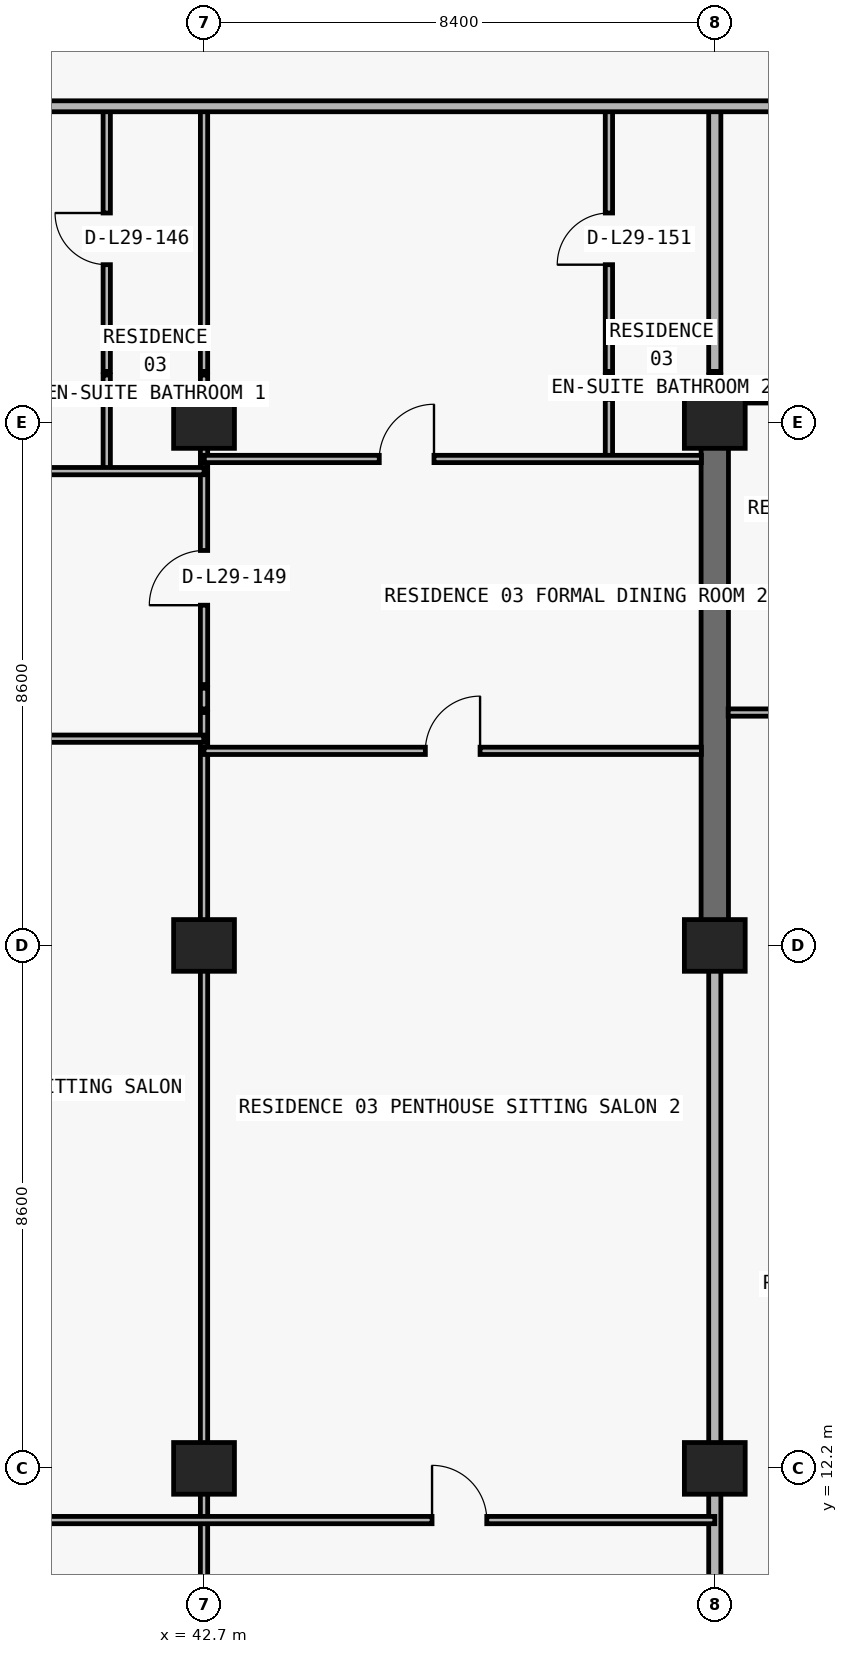
"""IFC4 building model, lengths in metres.
Left out: names, types, materials, properties, quantities, classifications, styles, units other than length and angle.
Written with IfcOpenShell. Run it as: python <this file> out.ifc"""

import sys

from ifc_helpers import new_model, si_unit, direction, frame, frame_2d, origin, origin_2d, place, context, subcontext, project, spatial, rectangle, extrude, element, fill, save


model = new_model("IFC4")
c1 = context("Model", 3, precision=1e-05, world=origin(), true_north=direction((0.0, 1.0)))
c2 = subcontext(c1, "Body", "Model", "MODEL_VIEW")
j1 = project(units=[si_unit("LENGTHUNIT", "METRE"), si_unit("PLANEANGLEUNIT", "RADIAN")], contexts=[c1])
p1 = place(None, origin())
s1 = spatial("IfcSite", under=j1, at=p1, CompositionType="ELEMENT")
p2 = place(p1, origin())
s2 = spatial("IfcBuilding", under=s1, at=p2, CompositionType="ELEMENT")
p3 = place(p2, frame((0.0, 0.0, 109.2)))
s3 = spatial("IfcBuildingStorey", under=s2, at=p3, CompositionType="ELEMENT", Elevation=109.2)
for number, where, z_axis, x_axis in (
    (1, (42.7, 12.2, 0.0), (0.0, 0.0, 1.0), (1.0, 0.0, 0.0)),
    (2, (51.1, 12.2, 0.0), (0.0, 0.0, 1.0), (1.0, 0.0, 0.0)),
    (3, (42.7, 20.8, 0.0), (0.0, 0.0, 1.0), (1.0, 0.0, 0.0)),
    (4, (51.1, 20.8, 0.0), (0.0, 0.0, 1.0), (1.0, 0.0, 0.0)),
    (5, (42.7, 29.4, 0.0), (0.0, 0.0, 1.0), (1.0, 0.0, 0.0)),
    (6, (51.1, 29.4, 0.0), (0.0, 0.0, 1.0), (1.0, 0.0, 0.0)),
):
    element("IfcColumn", number, at=place(p3, frame(where, z_axis=z_axis, x_axis=x_axis)), inside=s3, PredefinedType="COLUMN", context=c2, shape_type="SweptSolid", body=[
        extrude(rectangle(XDim=1.0, YDim=0.85, at=origin_2d()), origin(), (0.0, 0.0, 1.0), 3.05),
    ])
p4 = place(p3, frame((51.1, 20.8, 0.0), z_axis=(0.0, 0.0, 1.0), x_axis=(0.0, 1.0, 0.0)))
e7 = element("IfcWall", 7, at=p4, inside=s3, PredefinedType="SHEAR", context=c2, shape_type="SweptSolid", body=[
    extrude(rectangle(XDim=8.6, YDim=0.45, at=frame_2d((4.3, 0.0))), origin(), (0.0, 0.0, 1.0), 3.05),
])
p5 = place(p3, frame((41.1, 28.6, 0.0), z_axis=(0.0, 0.0, 1.0), x_axis=(0.0, 1.0, 0.0)))
e8 = element("IfcWall", 8, at=p5, inside=s3, PredefinedType="PARTITIONING", context=c2, shape_type="SweptSolid", body=[
    extrude(rectangle(XDim=1.18, YDim=0.12, at=frame_2d((0.59, 0.0))), origin(), (0.0, 0.0, 1.0), 2.679),
])
p6 = place(p3, frame((41.1, 29.84, 0.0), z_axis=(0.0, 0.0, 1.0), x_axis=(0.0, 1.0, 0.0)))
e9 = element("IfcWall", 9, at=p6, inside=s3, PredefinedType="PARTITIONING", context=c2, shape_type="SweptSolid", body=[
    extrude(rectangle(XDim=0.34, YDim=0.12, at=frame_2d((0.17, 0.0))), origin(), (0.0, 0.0, 1.0), 3.05),
])
p7 = place(p3, frame((41.1, 30.24, 0.0), z_axis=(0.0, 0.0, 1.0), x_axis=(0.0, 1.0, 0.0)))
e10 = element("IfcWall", 10, at=p7, inside=s3, PredefinedType="PARTITIONING", context=c2, shape_type="SweptSolid", body=[
    extrude(rectangle(XDim=4.36, YDim=0.12, at=frame_2d((2.18, 0.0))), origin(), (0.0, 0.0, 1.0), 3.05),
])
p8 = place(p7, frame((1.755, 0.0, 0.0)))
e11 = element("IfcOpeningElement", 11, at=p8, cuts=e10, PredefinedType="OPENING", context=c2, shape_type="SweptSolid", body=[
    extrude(rectangle(XDim=0.85, YDim=2.1, at=frame_2d((0.425, 1.05))), frame((0.0, 0.07, 0.0), z_axis=(0.0, -1.0, 0.0), x_axis=(1.0, 0.0, 0.0)), (0.0, 0.0, 1.0), 0.14),
])
p9 = place(p3, frame((42.7, 8.84, 0.0), z_axis=(0.0, 0.0, 1.0), x_axis=(0.0, 1.0, 0.0)))
e12 = element("IfcWall", 12, at=p9, inside=s3, PredefinedType="PARTITIONING", context=c2, shape_type="SweptSolid", body=[
    extrude(rectangle(XDim=15.79, YDim=0.12, at=frame_2d((7.895, 0.0))), origin(), (0.0, 0.0, 1.0), 2.174),
])
p10 = place(p3, frame((42.7, 24.69, 0.0), z_axis=(0.0, 0.0, 1.0), x_axis=(0.0, 1.0, 0.0)))
e13 = element("IfcWall", 13, at=p10, inside=s3, PredefinedType="PARTITIONING", context=c2, shape_type="SweptSolid", body=[
    extrude(rectangle(XDim=0.34, YDim=0.12, at=frame_2d((0.17, 0.0))), origin(), (0.0, 0.0, 1.0), 2.174),
])
p11 = place(p3, frame((42.7, 25.09, 0.0), z_axis=(0.0, 0.0, 1.0), x_axis=(0.0, 1.0, 0.0)))
e14 = element("IfcWall", 14, at=p11, inside=s3, PredefinedType="PARTITIONING", context=c2, shape_type="SweptSolid", body=[
    extrude(rectangle(XDim=4.69, YDim=0.12, at=frame_2d((2.345, 0.0))), origin(), (0.0, 0.0, 1.0), 2.174),
])
p12 = place(p11, frame((1.305, 0.0, 0.0)))
e15 = element("IfcOpeningElement", 15, at=p12, cuts=e14, PredefinedType="OPENING", context=c2, shape_type="SweptSolid", body=[
    extrude(rectangle(XDim=0.9, YDim=2.124, at=frame_2d((0.45, 1.062))), frame((0.0, 0.07, 0.0), z_axis=(0.0, -1.0, 0.0), x_axis=(1.0, 0.0, 0.0)), (0.0, 0.0, 1.0), 0.14),
])
p13 = place(p3, frame((42.7, 29.84, 0.0), z_axis=(0.0, 0.0, 1.0), x_axis=(0.0, 1.0, 0.0)))
e16 = element("IfcWall", 16, at=p13, inside=s3, PredefinedType="PARTITIONING", context=c2, shape_type="SweptSolid", body=[
    extrude(rectangle(XDim=0.34, YDim=0.12, at=frame_2d((0.17, 0.0))), origin(), (0.0, 0.0, 1.0), 2.174),
])
p14 = place(p3, frame((42.7, 30.24, 0.0), z_axis=(0.0, 0.0, 1.0), x_axis=(0.0, 1.0, 0.0)))
e17 = element("IfcWall", 17, at=p14, inside=s3, PredefinedType="PARTITIONING", context=c2, shape_type="SweptSolid", body=[
    extrude(rectangle(XDim=4.36, YDim=0.12, at=frame_2d((2.18, 0.0))), origin(), (0.0, 0.0, 1.0), 2.174),
])
p15 = place(p3, frame((49.359, 28.8, 0.0), z_axis=(0.0, 0.0, 1.0), x_axis=(0.0, 1.0, 0.0)))
e18 = element("IfcWall", 18, at=p15, inside=s3, PredefinedType="PARTITIONING", context=c2, shape_type="SweptSolid", body=[
    extrude(rectangle(XDim=0.98, YDim=0.12, at=frame_2d((0.49, 0.0))), origin(), (0.0, 0.0, 1.0), 3.05),
])
p16 = place(p3, frame((49.359, 29.84, 0.0), z_axis=(0.0, 0.0, 1.0), x_axis=(0.0, 1.0, 0.0)))
e19 = element("IfcWall", 19, at=p16, inside=s3, PredefinedType="PARTITIONING", context=c2, shape_type="SweptSolid", body=[
    extrude(rectangle(XDim=0.34, YDim=0.12, at=frame_2d((0.17, 0.0))), origin(), (0.0, 0.0, 1.0), 3.05),
])
p17 = place(p3, frame((49.359, 30.24, 0.0), z_axis=(0.0, 0.0, 1.0), x_axis=(0.0, 1.0, 0.0)))
e20 = element("IfcWall", 20, at=p17, inside=s3, PredefinedType="PARTITIONING", context=c2, shape_type="SweptSolid", body=[
    extrude(rectangle(XDim=4.36, YDim=0.12, at=frame_2d((2.18, 0.0))), origin(), (0.0, 0.0, 1.0), 3.05),
])
p18 = place(p17, frame((1.755, 0.0, 0.0)))
e21 = element("IfcOpeningElement", 21, at=p18, cuts=e20, PredefinedType="OPENING", context=c2, shape_type="SweptSolid", body=[
    extrude(rectangle(XDim=0.85, YDim=2.1, at=frame_2d((0.425, 1.05))), frame((0.0, 0.07, 0.0), z_axis=(0.0, -1.0, 0.0), x_axis=(1.0, 0.0, 0.0)), (0.0, 0.0, 1.0), 0.14),
])
p19 = place(p3, frame((51.1, 8.84, 0.0), z_axis=(0.0, 0.0, 1.0), x_axis=(0.0, 1.0, 0.0)))
e22 = element("IfcWall", 22, at=p19, inside=s3, PredefinedType="PARTITIONING", context=c2, shape_type="SweptSolid", body=[
    extrude(rectangle(XDim=11.955, YDim=0.2, at=frame_2d((5.978, 0.0))), origin(), (0.0, 0.0, 1.0), 2.174),
])
p20 = place(p3, frame((51.1, 29.405, 0.0), z_axis=(0.0, 0.0, 1.0), x_axis=(0.0, 1.0, 0.0)))
e23 = element("IfcWall", 23, at=p20, inside=s3, PredefinedType="PARTITIONING", context=c2, shape_type="SweptSolid", body=[
    extrude(rectangle(XDim=0.375, YDim=0.2, at=frame_2d((0.188, 0.0))), origin(), (0.0, 0.0, 1.0), 3.05),
])
p21 = place(p3, frame((51.1, 29.84, 0.0), z_axis=(0.0, 0.0, 1.0), x_axis=(0.0, 1.0, 0.0)))
e24 = element("IfcWall", 24, at=p21, inside=s3, PredefinedType="PARTITIONING", context=c2, shape_type="SweptSolid", body=[
    extrude(rectangle(XDim=0.34, YDim=0.2, at=frame_2d((0.17, 0.0))), origin(), (0.0, 0.0, 1.0), 2.335),
])
p22 = place(p3, frame((51.1, 30.24, 0.0), z_axis=(0.0, 0.0, 1.0), x_axis=(0.0, 1.0, 0.0)))
e25 = element("IfcWall", 25, at=p22, inside=s3, PredefinedType="PARTITIONING", context=c2, shape_type="SweptSolid", body=[
    extrude(rectangle(XDim=4.36, YDim=0.2, at=frame_2d((2.18, 0.0))), origin(), (0.0, 0.0, 1.0), 2.335),
])
p23 = place(p3, frame((35.1, 11.35, 0.0), z_axis=(0.0, 0.0, 1.0), x_axis=(1.0, 0.0, 0.0)))
e26 = element("IfcWall", 26, at=p23, inside=s3, PredefinedType="PARTITIONING", context=c2, shape_type="SweptSolid", body=[
    extrude(rectangle(XDim=16.0, YDim=0.12, at=frame_2d((8.0, 0.0))), origin(), (0.0, 0.0, 1.0), 3.05),
])
p24 = place(p23, frame((3.35, 0.0, 0.0)))
e27 = element("IfcOpeningElement", 27, at=p24, cuts=e26, PredefinedType="OPENING", context=c2, shape_type="SweptSolid", body=[
    extrude(rectangle(XDim=0.9, YDim=2.15, at=frame_2d((0.45, 1.075))), frame((0.0, 0.07, 0.0), z_axis=(0.0, -1.0, 0.0), x_axis=(1.0, 0.0, 0.0)), (0.0, 0.0, 1.0), 0.14),
])
p25 = place(p23, frame((11.35, 0.0, 0.0)))
e28 = element("IfcOpeningElement", 28, at=p25, cuts=e26, PredefinedType="OPENING", context=c2, shape_type="SweptSolid", body=[
    extrude(rectangle(XDim=0.9, YDim=2.15, at=frame_2d((0.45, 1.075))), frame((0.0, 0.07, 0.0), z_axis=(0.0, -1.0, 0.0), x_axis=(1.0, 0.0, 0.0)), (0.0, 0.0, 1.0), 0.14),
])
p26 = place(p3, frame((42.7, 24.0, 0.0), z_axis=(0.0, 0.0, 1.0), x_axis=(1.0, 0.0, 0.0)))
e29 = element("IfcWall", 29, at=p26, inside=s3, PredefinedType="PARTITIONING", context=c2, shape_type="SweptSolid", body=[
    extrude(rectangle(XDim=8.18, YDim=0.12, at=frame_2d((4.09, 0.0))), origin(), (0.0, 0.0, 1.0), 3.05),
])
p27 = place(p26, frame((3.64, 0.0, 0.0)))
e30 = element("IfcOpeningElement", 30, at=p27, cuts=e29, PredefinedType="OPENING", context=c2, shape_type="SweptSolid", body=[
    extrude(rectangle(XDim=0.9, YDim=2.15, at=frame_2d((0.45, 1.075))), frame((0.0, 0.07, 0.0), z_axis=(0.0, -1.0, 0.0), x_axis=(1.0, 0.0, 0.0)), (0.0, 0.0, 1.0), 0.14),
])
p28 = place(p3, frame((35.105, 24.2, 0.0), z_axis=(0.0, 0.0, 1.0), x_axis=(1.0, 0.0, 0.0)))
e31 = element("IfcWall", 31, at=p28, inside=s3, PredefinedType="PARTITIONING", context=c2, shape_type="SweptSolid", body=[
    extrude(rectangle(XDim=7.59, YDim=0.12, at=frame_2d((3.795, 0.0))), origin(), (0.0, 0.0, 1.0), 3.05),
])
p29 = place(p28, frame((3.345, 0.0, 0.0)))
e32 = element("IfcOpeningElement", 32, at=p29, cuts=e31, PredefinedType="OPENING", context=c2, shape_type="SweptSolid", body=[
    extrude(rectangle(XDim=0.9, YDim=2.15, at=frame_2d((0.45, 1.075))), frame((0.0, 0.07, 0.0), z_axis=(0.0, -1.0, 0.0), x_axis=(1.0, 0.0, 0.0)), (0.0, 0.0, 1.0), 0.14),
])
p30 = place(p3, frame((51.32, 24.63, 0.0), z_axis=(0.0, 0.0, 1.0), x_axis=(1.0, 0.0, 0.0)))
e33 = element("IfcWall", 33, at=p30, inside=s3, PredefinedType="PARTITIONING", context=c2, shape_type="SweptSolid", body=[
    extrude(rectangle(XDim=8.18, YDim=0.12, at=frame_2d((4.09, 0.0))), origin(), (0.0, 0.0, 1.0), 3.05),
])
p31 = place(p30, frame((1.583, 0.0, 0.0)))
e34 = element("IfcOpeningElement", 34, at=p31, cuts=e33, PredefinedType="OPENING", context=c2, shape_type="SweptSolid", body=[
    extrude(rectangle(XDim=0.9, YDim=2.15, at=frame_2d((0.45, 1.075))), frame((0.0, 0.07, 0.0), z_axis=(0.0, -1.0, 0.0), x_axis=(1.0, 0.0, 0.0)), (0.0, 0.0, 1.0), 0.14),
])
p32 = place(p30, frame((5.84, 0.0, 0.0)))
e35 = element("IfcOpeningElement", 35, at=p32, cuts=e33, PredefinedType="OPENING", context=c2, shape_type="SweptSolid", body=[
    extrude(rectangle(XDim=0.9, YDim=2.15, at=frame_2d((0.45, 1.075))), frame((0.0, 0.07, 0.0), z_axis=(0.0, -1.0, 0.0), x_axis=(1.0, 0.0, 0.0)), (0.0, 0.0, 1.0), 0.14),
])
p33 = place(p3, frame((35.1, 28.6, 0.0), z_axis=(0.0, 0.0, 1.0), x_axis=(1.0, 0.0, 0.0)))
e36 = element("IfcWall", 36, at=p33, inside=s3, PredefinedType="PARTITIONING", context=c2, shape_type="SweptSolid", body=[
    extrude(rectangle(XDim=7.6, YDim=0.12, at=frame_2d((3.8, 0.0))), origin(), (0.0, 0.0, 1.0), 3.05),
])
p34 = place(p33, frame((2.55, 0.0, 0.0)))
e37 = element("IfcOpeningElement", 37, at=p34, cuts=e36, PredefinedType="OPENING", context=c2, shape_type="SweptSolid", body=[
    extrude(rectangle(XDim=0.9, YDim=2.15, at=frame_2d((0.45, 1.075))), frame((0.0, 0.07, 0.0), z_axis=(0.0, -1.0, 0.0), x_axis=(1.0, 0.0, 0.0)), (0.0, 0.0, 1.0), 0.14),
])
p35 = place(p3, frame((42.705, 28.8, 0.0), z_axis=(0.0, 0.0, 1.0), x_axis=(1.0, 0.0, 0.0)))
e38 = element("IfcWall", 38, at=p35, inside=s3, PredefinedType="PARTITIONING", context=c2, shape_type="SweptSolid", body=[
    extrude(rectangle(XDim=8.175, YDim=0.12, at=frame_2d((4.087, 0.0))), origin(), (0.0, 0.0, 1.0), 3.05),
])
p36 = place(p35, frame((2.877, 0.0, 0.0)))
e39 = element("IfcOpeningElement", 39, at=p36, cuts=e38, PredefinedType="OPENING", context=c2, shape_type="SweptSolid", body=[
    extrude(rectangle(XDim=0.9, YDim=2.15, at=frame_2d((0.45, 1.075))), frame((0.0, 0.07, 0.0), z_axis=(0.0, -1.0, 0.0), x_axis=(1.0, 0.0, 0.0)), (0.0, 0.0, 1.0), 0.14),
])
p37 = place(p3, frame((51.1, 29.78, 0.0), z_axis=(0.0, 0.0, 1.0), x_axis=(1.0, 0.0, 0.0)))
e40 = element("IfcWall", 40, at=p37, inside=s3, PredefinedType="PARTITIONING", context=c2, shape_type="SweptSolid", body=[
    extrude(rectangle(XDim=8.4, YDim=0.12, at=frame_2d((4.2, 0.0))), origin(), (0.0, 0.0, 1.0), 3.05),
])
p38 = place(p37, frame((1.693, 0.0, 0.0)))
e41 = element("IfcOpeningElement", 41, at=p38, cuts=e40, PredefinedType="OPENING", context=c2, shape_type="SweptSolid", body=[
    extrude(rectangle(XDim=0.9, YDim=2.15, at=frame_2d((0.45, 1.075))), frame((0.0, 0.07, 0.0), z_axis=(0.0, -1.0, 0.0), x_axis=(1.0, 0.0, 0.0)), (0.0, 0.0, 1.0), 0.14),
])
p39 = place(p3, frame((26.7, 34.6, 0.0), z_axis=(0.0, 0.0, 1.0), x_axis=(1.0, 0.0, 0.0)))
e42 = element("IfcWall", 42, at=p39, inside=s3, PredefinedType="PARTITIONING", context=c2, shape_type="SweptSolid", body=[
    extrude(rectangle(XDim=32.8, YDim=0.18, at=frame_2d((16.4, 0.0))), origin(), (0.0, 0.0, 1.0), 3.05),
])
p40 = place(p39, frame((2.812, 0.0, 0.0)))
e43 = element("IfcOpeningElement", 43, at=p40, cuts=e42, PredefinedType="OPENING", context=c2, shape_type="SweptSolid", body=[
    extrude(rectangle(XDim=1.0, YDim=2.2, at=frame_2d((0.5, 1.1))), frame((0.0, 0.1, 0.0), z_axis=(0.0, -1.0, 0.0), x_axis=(1.0, 0.0, 0.0)), (0.0, 0.0, 1.0), 0.2),
])
p41 = place(p39, frame((27.104, 0.0, 0.0)))
e44 = element("IfcOpeningElement", 44, at=p41, cuts=e42, PredefinedType="OPENING", context=c2, shape_type="SweptSolid", body=[
    extrude(rectangle(XDim=1.0, YDim=2.2, at=frame_2d((0.5, 1.1))), frame((0.0, 0.1, 0.0), z_axis=(0.0, -1.0, 0.0), x_axis=(1.0, 0.0, 0.0)), (0.0, 0.0, 1.0), 0.2),
])
p42 = place(p8, origin())
e45 = element("IfcDoor", 45, at=p42, inside=s3, OperationType="SINGLE_SWING_RIGHT", PredefinedType="DOOR", context=c2, shape_type="SweptSolid", body=[
    extrude(rectangle(XDim=0.85, YDim=2.1, at=frame_2d((0.425, 1.05))), frame((0.0, 0.025, 0.0), z_axis=(0.0, -1.0, 0.0), x_axis=(1.0, 0.0, 0.0)), (0.0, 0.0, 1.0), 0.05),
])
fill(e11, e45)
p43 = place(p12, origin())
e46 = element("IfcDoor", 46, at=p43, inside=s3, OperationType="SINGLE_SWING_LEFT", PredefinedType="DOOR", context=c2, shape_type="SweptSolid", body=[
    extrude(rectangle(XDim=0.9, YDim=2.124, at=frame_2d((0.45, 1.062))), frame((0.0, 0.025, 0.0), z_axis=(0.0, -1.0, 0.0), x_axis=(1.0, 0.0, 0.0)), (0.0, 0.0, 1.0), 0.05),
])
fill(e15, e46)
p44 = place(p36, origin())
e47 = element("IfcDoor", 47, at=p44, inside=s3, OperationType="SINGLE_SWING_RIGHT", PredefinedType="DOOR", context=c2, shape_type="SweptSolid", body=[
    extrude(rectangle(XDim=0.9, YDim=2.15, at=frame_2d((0.45, 1.075))), frame((0.0, 0.025, 0.0), z_axis=(0.0, -1.0, 0.0), x_axis=(1.0, 0.0, 0.0)), (0.0, 0.0, 1.0), 0.05),
])
fill(e39, e47)
p45 = place(p18, origin())
e48 = element("IfcDoor", 48, at=p45, inside=s3, OperationType="SINGLE_SWING_LEFT", PredefinedType="DOOR", context=c2, shape_type="SweptSolid", body=[
    extrude(rectangle(XDim=0.85, YDim=2.1, at=frame_2d((0.425, 1.05))), frame((0.0, 0.025, 0.0), z_axis=(0.0, -1.0, 0.0), x_axis=(1.0, 0.0, 0.0)), (0.0, 0.0, 1.0), 0.05),
])
fill(e21, e48)
p46 = place(p27, origin())
e49 = element("IfcDoor", 49, at=p46, inside=s3, OperationType="SINGLE_SWING_RIGHT", PredefinedType="DOOR", context=c2, shape_type="SweptSolid", body=[
    extrude(rectangle(XDim=0.9, YDim=2.15, at=frame_2d((0.45, 1.075))), frame((0.0, 0.025, 0.0), z_axis=(0.0, -1.0, 0.0), x_axis=(1.0, 0.0, 0.0)), (0.0, 0.0, 1.0), 0.05),
])
fill(e30, e49)
p47 = place(p25, origin())
e50 = element("IfcDoor", 50, at=p47, inside=s3, OperationType="SINGLE_SWING_LEFT", PredefinedType="DOOR", context=c2, shape_type="SweptSolid", body=[
    extrude(rectangle(XDim=0.9, YDim=2.15, at=frame_2d((0.45, 1.075))), frame((0.0, 0.025, 0.0), z_axis=(0.0, -1.0, 0.0), x_axis=(1.0, 0.0, 0.0)), (0.0, 0.0, 1.0), 0.05),
])
fill(e28, e50)
save(model, sys.argv[1])
